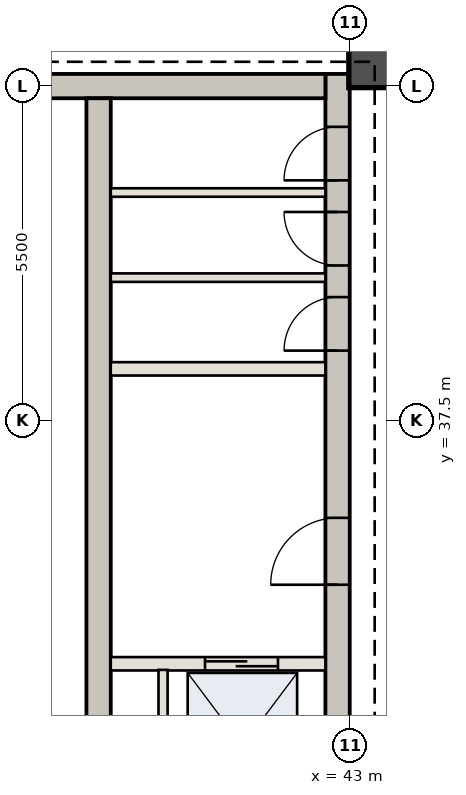
"""IFC4 building model, lengths in metres.
Left out: names, types, materials, properties, quantities, classifications, styles, units other than length and angle.
Written with IfcOpenShell. Run it as: python <this file> out.ifc"""

import sys

from ifc_helpers import new_model, si_unit, direction, frame, frame_2d, origin, origin_2d, place, context, subcontext, project, spatial, rectangle, extrude, element, fill, save


model = new_model("IFC4")
c1 = context("Model", 3, precision=1e-05, world=origin(), true_north=direction((0.0, 1.0)))
c2 = subcontext(c1, "Body", "Model", "MODEL_VIEW")
j1 = project(units=[si_unit("LENGTHUNIT", "METRE"), si_unit("PLANEANGLEUNIT", "RADIAN")], contexts=[c1])
p1 = place(None, origin())
s1 = spatial("IfcSite", under=j1, at=p1, CompositionType="ELEMENT")
p2 = place(p1, origin())
s2 = spatial("IfcBuilding", under=s1, at=p2, CompositionType="ELEMENT")
p3 = place(p2, frame((0.0, 0.0, 257.6)))
s3 = spatial("IfcBuildingStorey", under=s2, at=p3, CompositionType="ELEMENT", Elevation=257.6)
p4 = place(p3, frame((42.79, 30.6, 0.0), z_axis=(0.0, 0.0, 1.0), x_axis=(0.0, 1.0, 0.0)))
e1 = element("IfcWall", 1, at=p4, inside=s3, PredefinedType="SHEAR", context=c2, shape_type="SweptSolid", body=[
    extrude(rectangle(XDim=12.6, YDim=0.4, at=frame_2d((6.3, 0.0))), origin(), (0.0, 0.0, 1.0), 4.55),
])
p5 = place(p4, frame((4.2, 0.0, 0.0)))
e2 = element("IfcOpeningElement", 2, at=p5, cuts=e1, PredefinedType="OPENING", context=c2, shape_type="SweptSolid", body=[
    extrude(rectangle(XDim=1.1, YDim=2.15, at=frame_2d((0.55, 1.075))), frame((0.0, 0.21, 0.0), z_axis=(0.0, -1.0, 0.0), x_axis=(1.0, 0.0, 0.0)), (0.0, 0.0, 1.0), 0.42),
])
p6 = place(p4, frame((8.05, 0.0, 0.0)))
e3 = element("IfcOpeningElement", 3, at=p6, cuts=e1, PredefinedType="OPENING", context=c2, shape_type="SweptSolid", body=[
    extrude(rectangle(XDim=0.88, YDim=2.1, at=frame_2d((0.44, 1.05))), frame((0.0, 0.21, 0.0), z_axis=(0.0, -1.0, 0.0), x_axis=(1.0, 0.0, 0.0)), (0.0, 0.0, 1.0), 0.42),
])
p7 = place(p4, frame((9.45, 0.0, 0.0)))
e4 = element("IfcOpeningElement", 4, at=p7, cuts=e1, PredefinedType="OPENING", context=c2, shape_type="SweptSolid", body=[
    extrude(rectangle(XDim=0.88, YDim=2.1, at=frame_2d((0.44, 1.05))), frame((0.0, 0.21, 0.0), z_axis=(0.0, -1.0, 0.0), x_axis=(1.0, 0.0, 0.0)), (0.0, 0.0, 1.0), 0.42),
])
p8 = place(p4, frame((10.85, 0.0, 0.0)))
e5 = element("IfcOpeningElement", 5, at=p8, cuts=e1, PredefinedType="OPENING", context=c2, shape_type="SweptSolid", body=[
    extrude(rectangle(XDim=0.88, YDim=2.1, at=frame_2d((0.44, 1.05))), frame((0.0, 0.21, 0.0), z_axis=(0.0, -1.0, 0.0), x_axis=(1.0, 0.0, 0.0)), (0.0, 0.0, 1.0), 0.42),
])
p9 = place(p3, frame((37.75, 43.0, 0.0), z_axis=(0.0, 0.0, 1.0), x_axis=(1.0, 0.0, 0.0)))
e6 = element("IfcWall", 6, at=p9, inside=s3, PredefinedType="SHEAR", context=c2, shape_type="SweptSolid", body=[
    extrude(rectangle(XDim=4.84, YDim=0.4, at=frame_2d((2.42, 0.0))), origin(), (0.0, 0.0, 1.0), 4.55),
])
p10 = place(p3, frame((38.86, 30.6, 0.0), z_axis=(0.0, 0.0, 1.0), x_axis=(0.0, 1.0, 0.0)))
e7 = element("IfcWall", 7, at=p10, inside=s3, PredefinedType="SHEAR", context=c2, shape_type="SweptSolid", body=[
    extrude(rectangle(XDim=12.2, YDim=0.4, at=frame_2d((6.1, 0.0))), origin(), (0.0, 0.0, 1.0), 4.55),
])
p11 = place(p3, frame((43.35, 43.35, 0.0), z_axis=(0.0, 0.0, 1.0), x_axis=(1.0, 0.0, 0.0)))
e8 = element("IfcColumn", 8, at=p11, inside=s3, PredefinedType="COLUMN", context=c2, shape_type="SweptSolid", body=[
    extrude(rectangle(XDim=0.75, YDim=0.75, at=origin_2d()), origin(), (0.0, 0.0, 1.0), 4.55),
])
p12 = place(p3, frame((39.06, 33.5, 0.0), z_axis=(0.0, 0.0, 1.0), x_axis=(1.0, 0.0, 0.0)))
e9 = element("IfcWall", 9, at=p12, inside=s3, PredefinedType="STANDARD", context=c2, shape_type="SweptSolid", body=[
    extrude(rectangle(XDim=3.53, YDim=0.22, at=frame_2d((1.765, 0.0))), origin(), (0.0, 0.0, 1.0), 4.13),
])
p13 = place(p12, frame((1.55, 0.0, 0.0)))
e10 = element("IfcOpeningElement", 10, at=p13, cuts=e9, PredefinedType="OPENING", context=c2, shape_type="SweptSolid", body=[
    extrude(rectangle(XDim=1.2, YDim=2.2, at=frame_2d((0.6, 1.1))), frame((0.0, 0.12, 0.0), z_axis=(0.0, -1.0, 0.0), x_axis=(1.0, 0.0, 0.0)), (0.0, 0.0, 1.0), 0.24),
])
p14 = place(p3, frame((39.92, 30.75, 0.0), z_axis=(0.0, 0.0, 1.0), x_axis=(0.0, 1.0, 0.0)))
e11 = element("IfcWall", 11, at=p14, inside=s3, PredefinedType="STANDARD", context=c2, shape_type="SweptSolid", body=[
    extrude(rectangle(XDim=2.65, YDim=0.15, at=frame_2d((1.325, 0.0))), origin(), (0.0, 0.0, 1.0), 4.13),
])
p15 = place(p3, frame((39.06, 38.35, 0.0), z_axis=(0.0, 0.0, 1.0), x_axis=(1.0, 0.0, 0.0)))
e12 = element("IfcWall", 12, at=p15, inside=s3, PredefinedType="STANDARD", context=c2, shape_type="SweptSolid", body=[
    extrude(rectangle(XDim=3.53, YDim=0.22, at=frame_2d((1.765, 0.0))), origin(), (0.0, 0.0, 1.0), 4.13),
])
for number, where, z_axis, x_axis in (
    (13, (39.06, 39.85, 0.0), (0.0, 0.0, 1.0), (1.0, 0.0, 0.0)),
    (14, (39.06, 41.25, 0.0), (0.0, 0.0, 1.0), (1.0, 0.0, 0.0)),
):
    element("IfcWall", number, at=place(p3, frame(where, z_axis=z_axis, x_axis=x_axis)), inside=s3, PredefinedType="STANDARD", context=c2, shape_type="SweptSolid", body=[
        extrude(rectangle(XDim=3.53, YDim=0.14, at=frame_2d((1.765, 0.0))), origin(), (0.0, 0.0, 1.0), 4.13),
    ])
p16 = place(p5, origin())
e15 = element("IfcDoor", 15, at=p16, inside=s3, OperationType="SINGLE_SWING_LEFT", PredefinedType="DOOR", context=c2, shape_type="SweptSolid", body=[
    extrude(rectangle(XDim=1.1, YDim=2.15, at=frame_2d((0.55, 1.075))), frame((0.0, 0.025, 0.0), z_axis=(0.0, -1.0, 0.0), x_axis=(1.0, 0.0, 0.0)), (0.0, 0.0, 1.0), 0.05),
])
fill(e2, e15)
p17 = place(p6, origin())
e16 = element("IfcDoor", 16, at=p17, inside=s3, OperationType="SINGLE_SWING_LEFT", PredefinedType="DOOR", context=c2, shape_type="SweptSolid", body=[
    extrude(rectangle(XDim=0.88, YDim=2.1, at=frame_2d((0.44, 1.05))), frame((0.0, 0.025, 0.0), z_axis=(0.0, -1.0, 0.0), x_axis=(1.0, 0.0, 0.0)), (0.0, 0.0, 1.0), 0.05),
])
fill(e3, e16)
p18 = place(p7, origin())
e17 = element("IfcDoor", 17, at=p18, inside=s3, OperationType="SINGLE_SWING_RIGHT", PredefinedType="DOOR", context=c2, shape_type="SweptSolid", body=[
    extrude(rectangle(XDim=0.88, YDim=2.1, at=frame_2d((0.44, 1.05))), frame((0.0, 0.025, 0.0), z_axis=(0.0, -1.0, 0.0), x_axis=(1.0, 0.0, 0.0)), (0.0, 0.0, 1.0), 0.05),
])
fill(e4, e17)
p19 = place(p8, origin())
e18 = element("IfcDoor", 18, at=p19, inside=s3, OperationType="SINGLE_SWING_LEFT", PredefinedType="DOOR", context=c2, shape_type="SweptSolid", body=[
    extrude(rectangle(XDim=0.88, YDim=2.1, at=frame_2d((0.44, 1.05))), frame((0.0, 0.025, 0.0), z_axis=(0.0, -1.0, 0.0), x_axis=(1.0, 0.0, 0.0)), (0.0, 0.0, 1.0), 0.05),
])
fill(e5, e18)
p20 = place(p13, origin())
e19 = element("IfcDoor", 19, at=p20, inside=s3, OperationType="DOUBLE_DOOR_SLIDING", PredefinedType="DOOR", context=c2, shape_type="SweptSolid", body=[
    extrude(rectangle(XDim=1.2, YDim=2.2, at=frame_2d((0.6, 1.1))), frame((0.0, 0.025, 0.0), z_axis=(0.0, -1.0, 0.0), x_axis=(1.0, 0.0, 0.0)), (0.0, 0.0, 1.0), 0.05),
])
fill(e10, e19)
save(model, sys.argv[1])
